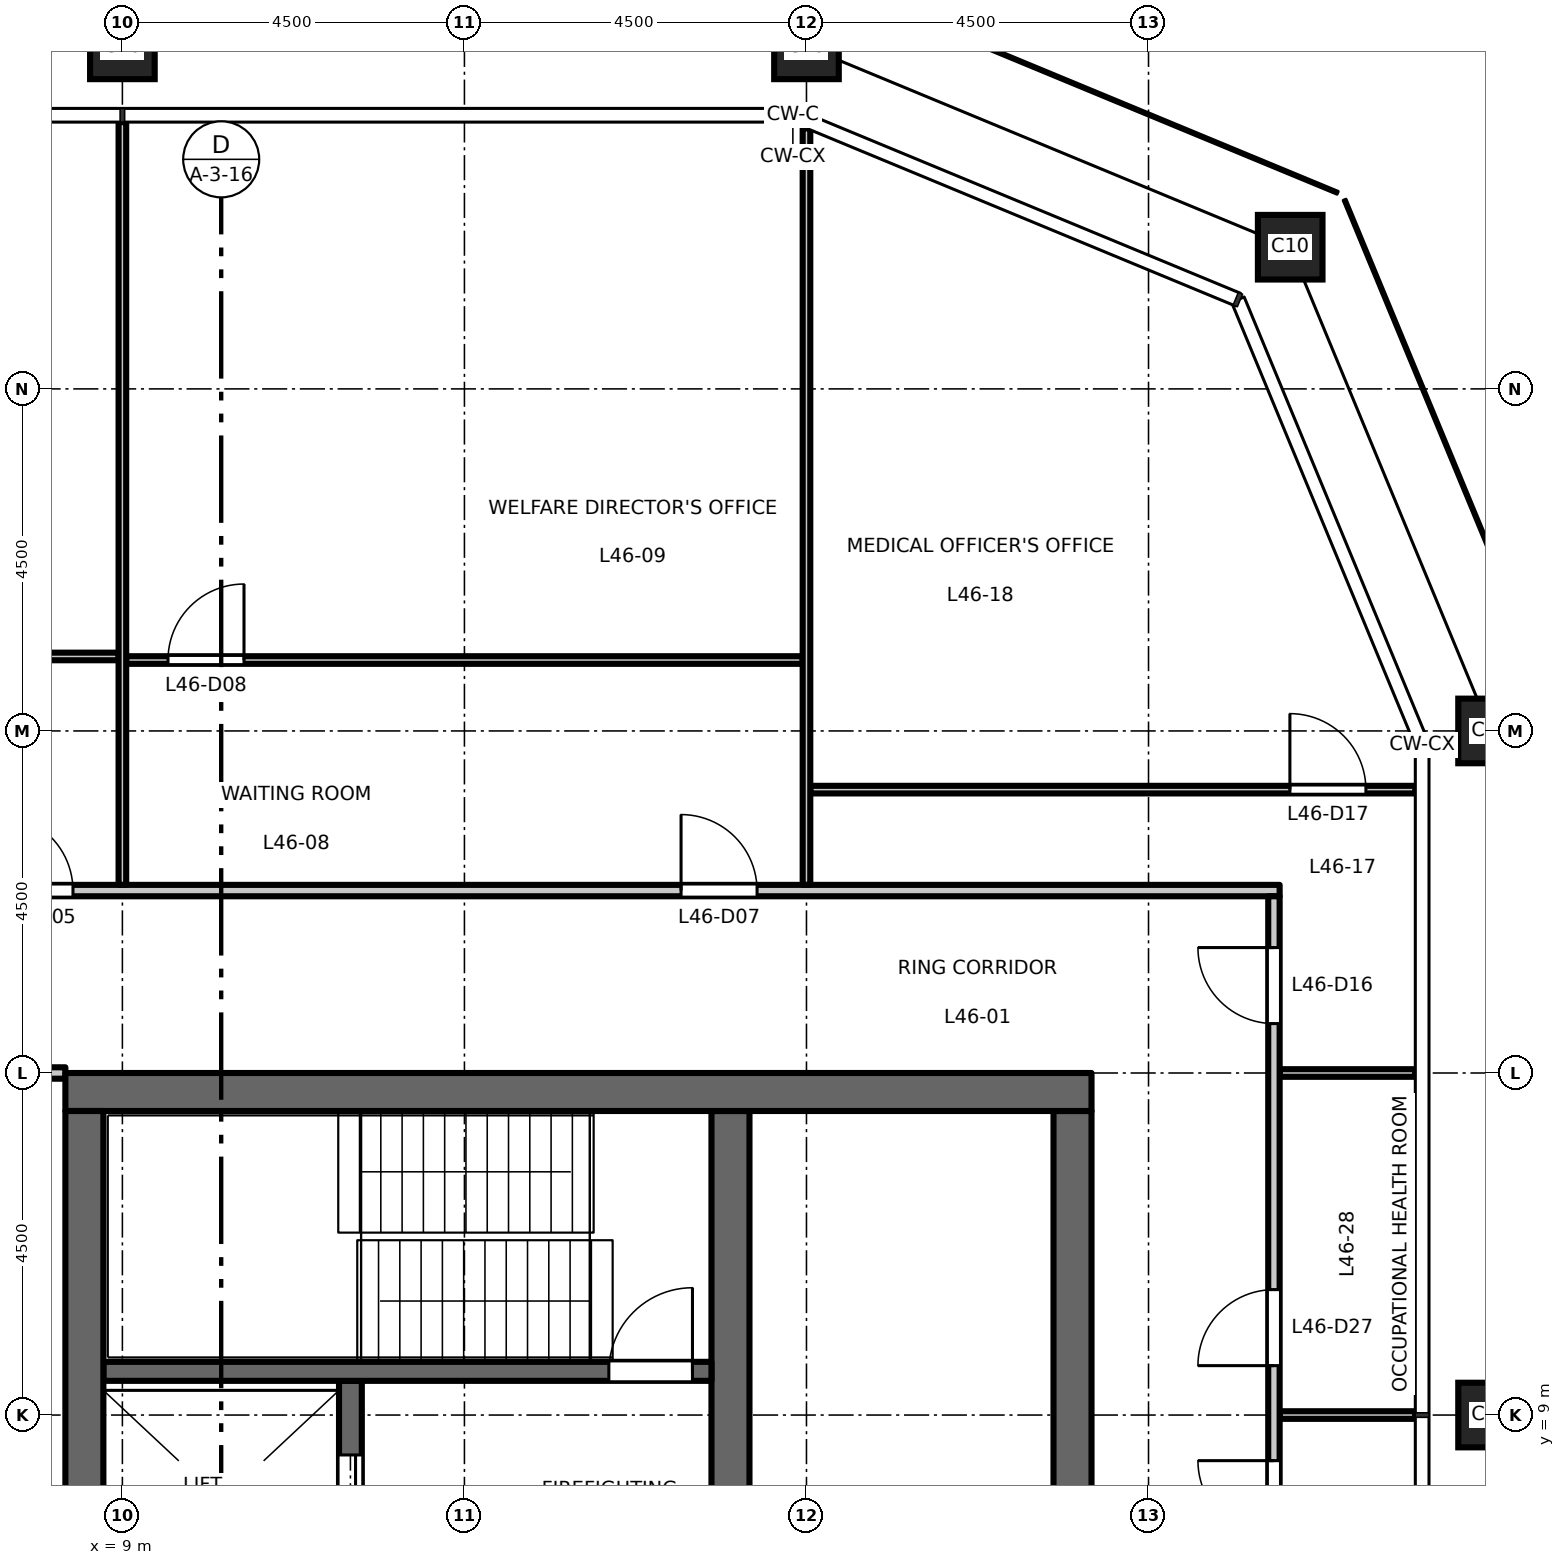
"""IFC4 building model, lengths in metres.
Left out: names, types, materials, properties, quantities, classifications, styles, units other than length and angle.
Written with IfcOpenShell. Run it as: python <this file> out.ifc"""

import sys

from ifc_helpers import new_model, si_unit, direction, frame, frame_2d, origin, origin_2d, place, context, subcontext, project, spatial, rectangle, hollow_rectangle, extrude, element, fill, save


model = new_model("IFC4")
c1 = context("Model", 3, precision=1e-05, world=origin(), true_north=direction((0.0, 1.0)))
c2 = subcontext(c1, "Body", "Model", "MODEL_VIEW")
j1 = project(units=[si_unit("LENGTHUNIT", "METRE"), si_unit("PLANEANGLEUNIT", "RADIAN")], contexts=[c1])
p1 = place(None, origin())
s1 = spatial("IfcSite", under=j1, at=p1, CompositionType="ELEMENT")
p2 = place(p1, origin())
s2 = spatial("IfcBuilding", under=s1, at=p2, CompositionType="ELEMENT")
p3 = place(p2, frame((0.0, 0.0, 215.2)))
s3 = spatial("IfcBuildingStorey", under=s2, at=p3, CompositionType="ELEMENT", Elevation=215.2)
for number, where, z_axis, x_axis in (
    (1, (27.0, 9.0, 0.0), (0.0, 0.0, 1.0), (1.0, 0.0, 0.0)),
    (2, (27.0, 18.0, 0.0), (0.0, 0.0, 1.0), (1.0, 0.0, 0.0)),
    (3, (24.364, 24.364, 0.0), (0.0, 0.0, 1.0), (1.0, 0.0, 0.0)),
    (4, (18.0, 27.0, 0.0), (0.0, 0.0, 1.0), (1.0, 0.0, 0.0)),
    (5, (9.0, 27.0, 0.0), (0.0, 0.0, 1.0), (1.0, 0.0, 0.0)),
):
    element("IfcColumn", number, at=place(p3, frame(where, z_axis=z_axis, x_axis=x_axis)), inside=s3, PredefinedType="COLUMN", context=c2, shape_type="SweptSolid", body=[
        extrude(hollow_rectangle(XDim=0.85, YDim=0.85, WallThickness=0.05, at=origin_2d()), origin(), (0.0, 0.0, 1.0), 4.5),
    ])
p4 = place(p3, frame((12.0, -9.45, 0.0), z_axis=(0.0, 0.0, 1.0), x_axis=(0.0, 1.0, 0.0)))
e6 = element("IfcWall", 6, at=p4, inside=s3, PredefinedType="SHEAR", context=c2, shape_type="SweptSolid", body=[
    extrude(rectangle(XDim=18.9, YDim=0.3, at=frame_2d((9.45, 0.0))), origin(), (0.0, 0.0, 1.0), 4.35),
])
p5 = place(p4, frame((4.725, 0.0, 0.0)))
e7 = element("IfcOpeningElement", 7, at=p5, cuts=e6, PredefinedType="OPENING", context=c2, shape_type="SweptSolid", body=[
    extrude(rectangle(XDim=1.1, YDim=2.1, at=frame_2d((0.55, 1.05))), frame((0.0, 0.16, 0.0), z_axis=(0.0, -1.0, 0.0), x_axis=(1.0, 0.0, 0.0)), (0.0, 0.0, 1.0), 0.32),
])
p6 = place(p4, frame((7.875, 0.0, 0.0)))
e8 = element("IfcOpeningElement", 8, at=p6, cuts=e6, PredefinedType="OPENING", context=c2, shape_type="SweptSolid", body=[
    extrude(rectangle(XDim=1.1, YDim=2.1, at=frame_2d((0.55, 1.05))), frame((0.0, 0.16, 0.0), z_axis=(0.0, -1.0, 0.0), x_axis=(1.0, 0.0, 0.0)), (0.0, 0.0, 1.0), 0.32),
])
p7 = place(p4, frame((11.025, 0.0, 0.0)))
e9 = element("IfcOpeningElement", 9, at=p7, cuts=e6, PredefinedType="OPENING", context=c2, shape_type="SweptSolid", body=[
    extrude(rectangle(XDim=1.1, YDim=2.1, at=frame_2d((0.55, 1.05))), frame((0.0, 0.16, 0.0), z_axis=(0.0, -1.0, 0.0), x_axis=(1.0, 0.0, 0.0)), (0.0, 0.0, 1.0), 0.32),
])
p8 = place(p4, frame((14.175, 0.0, 0.0)))
e10 = element("IfcOpeningElement", 10, at=p8, cuts=e6, PredefinedType="OPENING", context=c2, shape_type="SweptSolid", body=[
    extrude(rectangle(XDim=1.1, YDim=2.1, at=frame_2d((0.55, 1.05))), frame((0.0, 0.16, 0.0), z_axis=(0.0, -1.0, 0.0), x_axis=(1.0, 0.0, 0.0)), (0.0, 0.0, 1.0), 0.32),
])
p9 = place(p4, frame((16.725, 0.0, 0.0)))
e11 = element("IfcOpeningElement", 11, at=p9, cuts=e6, PredefinedType="OPENING", context=c2, shape_type="SweptSolid", body=[
    extrude(rectangle(XDim=1.2, YDim=2.1, at=frame_2d((0.6, 1.05))), frame((0.0, 0.16, 0.0), z_axis=(0.0, -1.0, 0.0), x_axis=(1.0, 0.0, 0.0)), (0.0, 0.0, 1.0), 0.32),
])
p10 = place(p4, frame((0.975, 0.0, 0.0)))
e12 = element("IfcOpeningElement", 12, at=p10, cuts=e6, PredefinedType="OPENING", context=c2, shape_type="SweptSolid", body=[
    extrude(rectangle(XDim=1.2, YDim=2.1, at=frame_2d((0.6, 1.05))), frame((0.0, 0.16, 0.0), z_axis=(0.0, -1.0, 0.0), x_axis=(1.0, 0.0, 0.0)), (0.0, 0.0, 1.0), 0.32),
])
p11 = place(p3, frame((21.5, -13.0, 0.0), z_axis=(0.0, 0.0, 1.0), x_axis=(0.0, 1.0, 0.0)))
e13 = element("IfcWall", 13, at=p11, inside=s3, PredefinedType="SHEAR", context=c2, shape_type="SweptSolid", body=[
    extrude(rectangle(XDim=26.0, YDim=0.5, at=frame_2d((13.0, 0.0))), origin(), (0.0, 0.0, 1.0), 4.35),
])
p12 = place(p11, frame((16.825, 0.0, 0.0)))
e14 = element("IfcOpeningElement", 14, at=p12, cuts=e13, PredefinedType="OPENING", context=c2, shape_type="SweptSolid", body=[
    extrude(rectangle(XDim=1.8, YDim=2.1, at=frame_2d((0.9, 1.05))), frame((0.0, 0.26, 0.0), z_axis=(0.0, -1.0, 0.0), x_axis=(1.0, 0.0, 0.0)), (0.0, 0.0, 1.0), 0.52),
])
p13 = place(p11, frame((7.375, 0.0, 0.0)))
e15 = element("IfcOpeningElement", 15, at=p13, cuts=e13, PredefinedType="OPENING", context=c2, shape_type="SweptSolid", body=[
    extrude(rectangle(XDim=1.8, YDim=2.1, at=frame_2d((0.9, 1.05))), frame((0.0, 0.26, 0.0), z_axis=(0.0, -1.0, 0.0), x_axis=(1.0, 0.0, 0.0)), (0.0, 0.0, 1.0), 0.52),
])
p14 = place(p3, frame((17.0, 6.425, 0.0), z_axis=(0.0, 0.0, 1.0), x_axis=(0.0, 1.0, 0.0)))
e16 = element("IfcWall", 16, at=p14, inside=s3, PredefinedType="SHEAR", context=c2, shape_type="SweptSolid", body=[
    extrude(rectangle(XDim=6.575, YDim=0.5, at=frame_2d((3.288, 0.0))), origin(), (0.0, 0.0, 1.0), 4.35),
])
p15 = place(p3, frame((8.75, 9.575, 0.0), z_axis=(0.0, 0.0, 1.0), x_axis=(1.0, 0.0, 0.0)))
e17 = element("IfcWall", 17, at=p15, inside=s3, PredefinedType="SHEAR", context=c2, shape_type="SweptSolid", body=[
    extrude(rectangle(XDim=8.0, YDim=0.25, at=frame_2d((4.0, 0.0))), origin(), (0.0, 0.0, 1.0), 4.35),
])
p16 = place(p15, frame((6.65, 0.0, 0.0)))
e18 = element("IfcOpeningElement", 18, at=p16, cuts=e17, PredefinedType="OPENING", context=c2, shape_type="SweptSolid", body=[
    extrude(rectangle(XDim=1.1, YDim=2.1, at=frame_2d((0.55, 1.05))), frame((0.0, 0.135, 0.0), z_axis=(0.0, -1.0, 0.0), x_axis=(1.0, 0.0, 0.0)), (0.0, 0.0, 1.0), 0.27),
])
p17 = place(p3, frame((8.25, 13.25, 0.0), z_axis=(0.0, 0.0, 1.0), x_axis=(1.0, 0.0, 0.0)))
e19 = element("IfcWall", 19, at=p17, inside=s3, PredefinedType="SHEAR", context=c2, shape_type="SweptSolid", body=[
    extrude(rectangle(XDim=13.5, YDim=0.5, at=frame_2d((6.75, 0.0))), origin(), (0.0, 0.0, 1.0), 4.35),
])
p18 = place(p3, frame((8.5, -13.0, 0.0), z_axis=(0.0, 0.0, 1.0), x_axis=(0.0, 1.0, 0.0)))
e20 = element("IfcWall", 20, at=p18, inside=s3, PredefinedType="SHEAR", context=c2, shape_type="SweptSolid", body=[
    extrude(rectangle(XDim=26.0, YDim=0.5, at=frame_2d((13.0, 0.0))), origin(), (0.0, 0.0, 1.0), 4.35),
])
for number, where, z_axis, x_axis in (
    (21, (24.225, 9.0, 0.0), (0.0, 0.0, 1.0), (1.0, 0.0, 0.0)),
    (22, (24.225, 13.5, 0.0), (0.0, 0.0, 1.0), (1.0, 0.0, 0.0)),
):
    element("IfcWall", number, at=place(p3, frame(where, z_axis=z_axis, x_axis=x_axis)), inside=s3, PredefinedType="PARTITIONING", context=c2, shape_type="SweptSolid", body=[
        extrude(rectangle(XDim=1.785, YDim=0.1, at=frame_2d((0.893, 0.0))), origin(), (0.0, 0.0, 1.0), 4.35),
    ])
p19 = place(p3, frame((-8.25, 13.5, 0.0), z_axis=(0.0, 0.0, 1.0), x_axis=(1.0, 0.0, 0.0)))
e23 = element("IfcWall", 23, at=p19, inside=s3, PredefinedType="PARTITIONING", context=c2, shape_type="SweptSolid", body=[
    extrude(rectangle(XDim=16.5, YDim=0.15, at=frame_2d((8.25, 0.0))), origin(), (0.0, 0.0, 1.0), 4.35),
])
p20 = place(p19, frame((6.65, 0.0, 0.0)))
e24 = element("IfcOpeningElement", 24, at=p20, cuts=e23, PredefinedType="OPENING", context=c2, shape_type="SweptSolid", body=[
    extrude(rectangle(XDim=1.0, YDim=2.1, at=frame_2d((0.5, 1.05))), frame((0.0, 0.085, 0.0), z_axis=(0.0, -1.0, 0.0), x_axis=(1.0, 0.0, 0.0)), (0.0, 0.0, 1.0), 0.17),
])
p21 = place(p19, frame((8.9, 0.0, 0.0)))
e25 = element("IfcOpeningElement", 25, at=p21, cuts=e23, PredefinedType="OPENING", context=c2, shape_type="SweptSolid", body=[
    extrude(rectangle(XDim=1.0, YDim=2.1, at=frame_2d((0.5, 1.05))), frame((0.0, 0.085, 0.0), z_axis=(0.0, -1.0, 0.0), x_axis=(1.0, 0.0, 0.0)), (0.0, 0.0, 1.0), 0.17),
])
p22 = place(p3, frame((-24.225, 15.9, 0.0), z_axis=(0.0, 0.0, 1.0), x_axis=(1.0, 0.0, 0.0)))
e26 = element("IfcWall", 26, at=p22, inside=s3, PredefinedType="PARTITIONING", context=c2, shape_type="SweptSolid", body=[
    extrude(rectangle(XDim=48.45, YDim=0.15, at=frame_2d((24.225, 0.0))), origin(), (0.0, 0.0, 1.0), 4.35),
])
p23 = place(p22, frame((13.575, 0.0, 0.0)))
e27 = element("IfcOpeningElement", 27, at=p23, cuts=e26, PredefinedType="OPENING", context=c2, shape_type="SweptSolid", body=[
    extrude(rectangle(XDim=1.0, YDim=2.1, at=frame_2d((0.5, 1.05))), frame((0.0, 0.085, 0.0), z_axis=(0.0, -1.0, 0.0), x_axis=(1.0, 0.0, 0.0)), (0.0, 0.0, 1.0), 0.17),
])
p24 = place(p22, frame((15.825, 0.0, 0.0)))
e28 = element("IfcOpeningElement", 28, at=p24, cuts=e26, PredefinedType="OPENING", context=c2, shape_type="SweptSolid", body=[
    extrude(rectangle(XDim=1.0, YDim=2.1, at=frame_2d((0.5, 1.05))), frame((0.0, 0.085, 0.0), z_axis=(0.0, -1.0, 0.0), x_axis=(1.0, 0.0, 0.0)), (0.0, 0.0, 1.0), 0.17),
])
p25 = place(p22, frame((31.575, 0.0, 0.0)))
e29 = element("IfcOpeningElement", 29, at=p25, cuts=e26, PredefinedType="OPENING", context=c2, shape_type="SweptSolid", body=[
    extrude(rectangle(XDim=1.0, YDim=2.1, at=frame_2d((0.5, 1.05))), frame((0.0, 0.085, 0.0), z_axis=(0.0, -1.0, 0.0), x_axis=(1.0, 0.0, 0.0)), (0.0, 0.0, 1.0), 0.17),
])
p26 = place(p22, frame((40.575, 0.0, 0.0)))
e30 = element("IfcOpeningElement", 30, at=p26, cuts=e26, PredefinedType="OPENING", context=c2, shape_type="SweptSolid", body=[
    extrude(rectangle(XDim=1.0, YDim=2.1, at=frame_2d((0.5, 1.05))), frame((0.0, 0.085, 0.0), z_axis=(0.0, -1.0, 0.0), x_axis=(1.0, 0.0, 0.0)), (0.0, 0.0, 1.0), 0.17),
])
p27 = place(p22, frame((4.575, 0.0, 0.0)))
e31 = element("IfcOpeningElement", 31, at=p27, cuts=e26, PredefinedType="OPENING", context=c2, shape_type="SweptSolid", body=[
    extrude(rectangle(XDim=1.0, YDim=2.1, at=frame_2d((0.5, 1.05))), frame((0.0, 0.085, 0.0), z_axis=(0.0, -1.0, 0.0), x_axis=(1.0, 0.0, 0.0)), (0.0, 0.0, 1.0), 0.17),
])
p28 = place(p3, frame((18.05, 17.228, 0.0), z_axis=(0.0, 0.0, 1.0), x_axis=(1.0, 0.0, 0.0)))
e32 = element("IfcWall", 32, at=p28, inside=s3, PredefinedType="PARTITIONING", context=c2, shape_type="SweptSolid", body=[
    extrude(rectangle(XDim=7.96, YDim=0.1, at=frame_2d((3.98, 0.0))), origin(), (0.0, 0.0, 1.0), 4.35),
])
p29 = place(p28, frame((6.31, 0.0, 0.0)))
e33 = element("IfcOpeningElement", 33, at=p29, cuts=e32, PredefinedType="OPENING", context=c2, shape_type="SweptSolid", body=[
    extrude(rectangle(XDim=1.0, YDim=2.1, at=frame_2d((0.5, 1.05))), frame((0.0, 0.06, 0.0), z_axis=(0.0, -1.0, 0.0), x_axis=(1.0, 0.0, 0.0)), (0.0, 0.0, 1.0), 0.12),
])
p30 = place(p3, frame((9.05, 18.933, 0.0), z_axis=(0.0, 0.0, 1.0), x_axis=(1.0, 0.0, 0.0)))
e34 = element("IfcWall", 34, at=p30, inside=s3, PredefinedType="PARTITIONING", context=c2, shape_type="SweptSolid", body=[
    extrude(rectangle(XDim=8.9, YDim=0.1, at=frame_2d((4.45, 0.0))), origin(), (0.0, 0.0, 1.0), 4.35),
])
p31 = place(p30, frame((0.55, 0.0, 0.0)))
e35 = element("IfcOpeningElement", 35, at=p31, cuts=e34, PredefinedType="OPENING", context=c2, shape_type="SweptSolid", body=[
    extrude(rectangle(XDim=1.0, YDim=2.1, at=frame_2d((0.5, 1.05))), frame((0.0, 0.06, 0.0), z_axis=(0.0, -1.0, 0.0), x_axis=(1.0, 0.0, 0.0)), (0.0, 0.0, 1.0), 0.12),
])
p32 = place(p3, frame((0.05, 18.98, 0.0), z_axis=(0.0, 0.0, 1.0), x_axis=(1.0, 0.0, 0.0)))
e36 = element("IfcWall", 36, at=p32, inside=s3, PredefinedType="PARTITIONING", context=c2, shape_type="SweptSolid", body=[
    extrude(rectangle(XDim=8.9, YDim=0.1, at=frame_2d((4.45, 0.0))), origin(), (0.0, 0.0, 1.0), 4.35),
])
p33 = place(p32, frame((0.55, 0.0, 0.0)))
e37 = element("IfcOpeningElement", 37, at=p33, cuts=e36, PredefinedType="OPENING", context=c2, shape_type="SweptSolid", body=[
    extrude(rectangle(XDim=1.0, YDim=2.1, at=frame_2d((0.5, 1.05))), frame((0.0, 0.06, 0.0), z_axis=(0.0, -1.0, 0.0), x_axis=(1.0, 0.0, 0.0)), (0.0, 0.0, 1.0), 0.12),
])
p34 = place(p3, frame((9.0, 15.975, 0.0), z_axis=(0.0, 0.0, 1.0), x_axis=(0.0, 1.0, 0.0)))
e38 = element("IfcWall", 38, at=p34, inside=s3, PredefinedType="PARTITIONING", context=c2, shape_type="SweptSolid", body=[
    extrude(rectangle(XDim=10.035, YDim=0.1, at=frame_2d((5.018, 0.0))), origin(), (0.0, 0.0, 1.0), 3.65),
])
p35 = place(p3, frame((18.0, 15.975, 0.0), z_axis=(0.0, 0.0, 1.0), x_axis=(0.0, 1.0, 0.0)))
e39 = element("IfcWall", 39, at=p35, inside=s3, PredefinedType="PARTITIONING", context=c2, shape_type="SweptSolid", body=[
    extrude(rectangle(XDim=9.953, YDim=0.1, at=frame_2d((4.977, 0.0))), origin(), (0.0, 0.0, 1.0), 3.65),
])
p36 = place(p3, frame((24.15, -15.825, 0.0), z_axis=(0.0, 0.0, 1.0), x_axis=(0.0, 1.0, 0.0)))
e40 = element("IfcWall", 40, at=p36, inside=s3, PredefinedType="PARTITIONING", context=c2, shape_type="SweptSolid", body=[
    extrude(rectangle(XDim=31.65, YDim=0.15, at=frame_2d((15.825, 0.0))), origin(), (0.0, 0.0, 1.0), 4.35),
])
p37 = place(p36, frame((29.975, 0.0, 0.0)))
e41 = element("IfcOpeningElement", 41, at=p37, cuts=e40, PredefinedType="OPENING", context=c2, shape_type="SweptSolid", body=[
    extrude(rectangle(XDim=1.0, YDim=2.1, at=frame_2d((0.5, 1.05))), frame((0.0, 0.085, 0.0), z_axis=(0.0, -1.0, 0.0), x_axis=(1.0, 0.0, 0.0)), (0.0, 0.0, 1.0), 0.17),
])
p38 = place(p36, frame((5.225, 0.0, 0.0)))
e42 = element("IfcOpeningElement", 42, at=p38, cuts=e40, PredefinedType="OPENING", context=c2, shape_type="SweptSolid", body=[
    extrude(rectangle(XDim=1.0, YDim=2.1, at=frame_2d((0.5, 1.05))), frame((0.0, 0.085, 0.0), z_axis=(0.0, -1.0, 0.0), x_axis=(1.0, 0.0, 0.0)), (0.0, 0.0, 1.0), 0.17),
])
p39 = place(p36, frame((7.475, 0.0, 0.0)))
e43 = element("IfcOpeningElement", 43, at=p39, cuts=e40, PredefinedType="OPENING", context=c2, shape_type="SweptSolid", body=[
    extrude(rectangle(XDim=1.0, YDim=2.1, at=frame_2d((0.5, 1.05))), frame((0.0, 0.085, 0.0), z_axis=(0.0, -1.0, 0.0), x_axis=(1.0, 0.0, 0.0)), (0.0, 0.0, 1.0), 0.17),
])
p40 = place(p36, frame((23.225, 0.0, 0.0)))
e44 = element("IfcOpeningElement", 44, at=p40, cuts=e40, PredefinedType="OPENING", context=c2, shape_type="SweptSolid", body=[
    extrude(rectangle(XDim=1.0, YDim=2.1, at=frame_2d((0.5, 1.05))), frame((0.0, 0.085, 0.0), z_axis=(0.0, -1.0, 0.0), x_axis=(1.0, 0.0, 0.0)), (0.0, 0.0, 1.0), 0.17),
])
p41 = place(p36, frame((25.475, 0.0, 0.0)))
e45 = element("IfcOpeningElement", 45, at=p41, cuts=e40, PredefinedType="OPENING", context=c2, shape_type="SweptSolid", body=[
    extrude(rectangle(XDim=1.0, YDim=2.1, at=frame_2d((0.5, 1.05))), frame((0.0, 0.085, 0.0), z_axis=(0.0, -1.0, 0.0), x_axis=(1.0, 0.0, 0.0)), (0.0, 0.0, 1.0), 0.17),
])
p42 = place(p16, origin())
e46 = element("IfcDoor", 46, at=p42, inside=s3, OperationType="SINGLE_SWING_LEFT", PredefinedType="DOOR", context=c2, shape_type="SweptSolid", body=[
    extrude(rectangle(XDim=1.1, YDim=2.1, at=frame_2d((0.55, 1.05))), frame((0.0, 0.025, 0.0), z_axis=(0.0, -1.0, 0.0), x_axis=(1.0, 0.0, 0.0)), (0.0, 0.0, 1.0), 0.05),
])
fill(e18, e46)
p43 = place(p9, origin())
e47 = element("IfcDoor", 47, at=p43, inside=s3, OperationType="DOUBLE_DOOR_SLIDING", PredefinedType="DOOR", context=c2, shape_type="SweptSolid", body=[
    extrude(rectangle(XDim=1.2, YDim=2.1, at=frame_2d((0.6, 1.05))), frame((0.0, 0.025, 0.0), z_axis=(0.0, -1.0, 0.0), x_axis=(1.0, 0.0, 0.0)), (0.0, 0.0, 1.0), 0.05),
])
fill(e11, e47)
p44 = place(p25, origin())
e48 = element("IfcDoor", 48, at=p44, inside=s3, OperationType="SINGLE_SWING_LEFT", PredefinedType="DOOR", context=c2, shape_type="SweptSolid", body=[
    extrude(rectangle(XDim=1.0, YDim=2.1, at=frame_2d((0.5, 1.05))), frame((0.0, 0.025, 0.0), z_axis=(0.0, -1.0, 0.0), x_axis=(1.0, 0.0, 0.0)), (0.0, 0.0, 1.0), 0.05),
])
fill(e29, e48)
p45 = place(p26, origin())
e49 = element("IfcDoor", 49, at=p45, inside=s3, OperationType="SINGLE_SWING_LEFT", PredefinedType="DOOR", context=c2, shape_type="SweptSolid", body=[
    extrude(rectangle(XDim=1.0, YDim=2.1, at=frame_2d((0.5, 1.05))), frame((0.0, 0.025, 0.0), z_axis=(0.0, -1.0, 0.0), x_axis=(1.0, 0.0, 0.0)), (0.0, 0.0, 1.0), 0.05),
])
fill(e30, e49)
p46 = place(p31, origin())
e50 = element("IfcDoor", 50, at=p46, inside=s3, OperationType="SINGLE_SWING_RIGHT", PredefinedType="DOOR", context=c2, shape_type="SweptSolid", body=[
    extrude(rectangle(XDim=1.0, YDim=2.1, at=frame_2d((0.5, 1.05))), frame((0.0, 0.025, 0.0), z_axis=(0.0, -1.0, 0.0), x_axis=(1.0, 0.0, 0.0)), (0.0, 0.0, 1.0), 0.05),
])
fill(e35, e50)
p47 = place(p37, origin())
e51 = element("IfcDoor", 51, at=p47, inside=s3, OperationType="SINGLE_SWING_RIGHT", PredefinedType="DOOR", context=c2, shape_type="SweptSolid", body=[
    extrude(rectangle(XDim=1.0, YDim=2.1, at=frame_2d((0.5, 1.05))), frame((0.0, 0.025, 0.0), z_axis=(0.0, -1.0, 0.0), x_axis=(1.0, 0.0, 0.0)), (0.0, 0.0, 1.0), 0.05),
])
fill(e41, e51)
p48 = place(p29, origin())
e52 = element("IfcDoor", 52, at=p48, inside=s3, OperationType="SINGLE_SWING_LEFT", PredefinedType="DOOR", context=c2, shape_type="SweptSolid", body=[
    extrude(rectangle(XDim=1.0, YDim=2.1, at=frame_2d((0.5, 1.05))), frame((0.0, 0.025, 0.0), z_axis=(0.0, -1.0, 0.0), x_axis=(1.0, 0.0, 0.0)), (0.0, 0.0, 1.0), 0.05),
])
fill(e33, e52)
p49 = place(p40, origin())
e53 = element("IfcDoor", 53, at=p49, inside=s3, OperationType="SINGLE_SWING_RIGHT", PredefinedType="DOOR", context=c2, shape_type="SweptSolid", body=[
    extrude(rectangle(XDim=1.0, YDim=2.1, at=frame_2d((0.5, 1.05))), frame((0.0, 0.025, 0.0), z_axis=(0.0, -1.0, 0.0), x_axis=(1.0, 0.0, 0.0)), (0.0, 0.0, 1.0), 0.05),
])
fill(e44, e53)
p50 = place(p41, origin())
e54 = element("IfcDoor", 54, at=p50, inside=s3, OperationType="SINGLE_SWING_LEFT", PredefinedType="DOOR", context=c2, shape_type="SweptSolid", body=[
    extrude(rectangle(XDim=1.0, YDim=2.1, at=frame_2d((0.5, 1.05))), frame((0.0, 0.025, 0.0), z_axis=(0.0, -1.0, 0.0), x_axis=(1.0, 0.0, 0.0)), (0.0, 0.0, 1.0), 0.05),
])
fill(e45, e54)
save(model, sys.argv[1])
